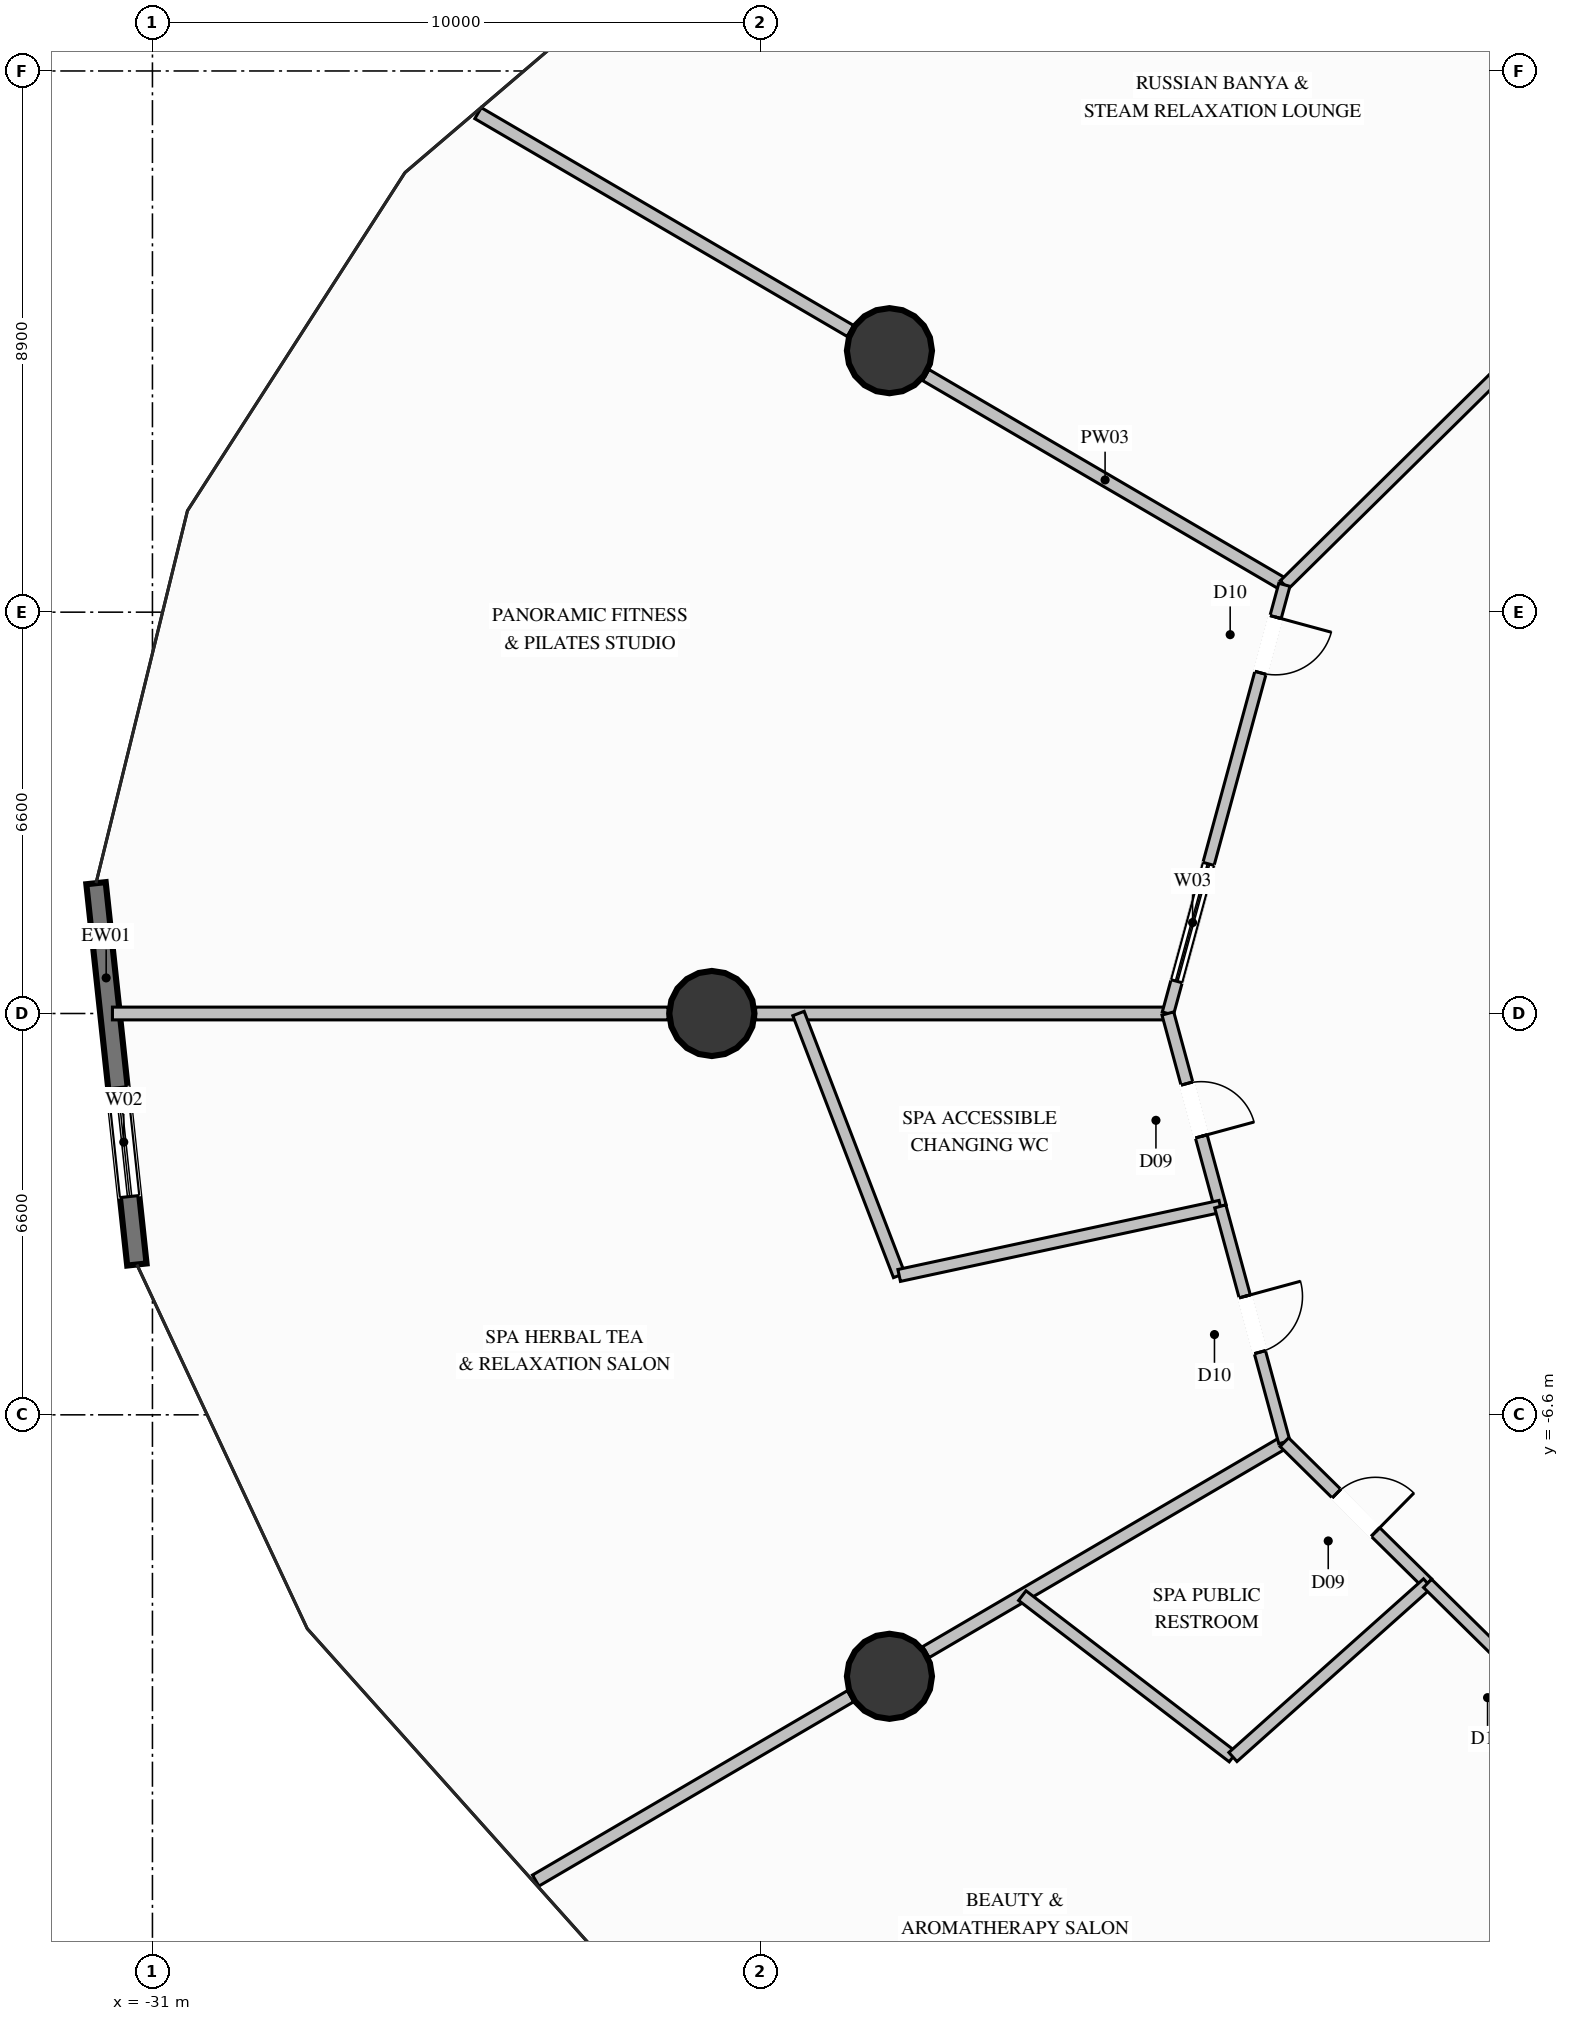
"""IFC4 building model, lengths in metres.
Left out: names, types, materials, properties, quantities, classifications, styles, units other than length and angle.
Written with IfcOpenShell. Run it as: python <this file> out.ifc"""

import sys

from ifc_helpers import new_model, si_unit, direction, frame, frame_2d, origin, origin_2d, place, context, subcontext, project, spatial, rectangle, circle, extrude, element, fill, save


model = new_model("IFC4")
c1 = context("Model", 3, precision=1e-05, world=origin(), true_north=direction((0.0, 1.0)))
c2 = subcontext(c1, "Body", "Model", "MODEL_VIEW")
j1 = project(units=[si_unit("LENGTHUNIT", "METRE"), si_unit("PLANEANGLEUNIT", "RADIAN")], contexts=[c1])
p1 = place(None, origin())
s1 = spatial("IfcSite", under=j1, at=p1, CompositionType="ELEMENT")
p2 = place(p1, origin())
s2 = spatial("IfcBuilding", under=s1, at=p2, CompositionType="ELEMENT")
p3 = place(p2, frame((0.0, 0.0, 23.6)))
s3 = spatial("IfcBuildingStorey", under=s2, at=p3, CompositionType="ELEMENT", Elevation=23.6)
for number, where, z_axis, x_axis in (
    (1, (-18.879, 10.9, 0.0), (0.0, 0.0, 1.0), (1.0, 0.0, 0.0)),
    (2, (-21.8, 0.0, 0.0), (0.0, 0.0, 1.0), (1.0, 0.0, 0.0)),
    (3, (-18.879, -10.9, 0.0), (0.0, 0.0, 1.0), (1.0, 0.0, 0.0)),
):
    element("IfcColumn", number, at=place(p3, frame(where, z_axis=z_axis, x_axis=x_axis)), inside=s3, PredefinedType="COLUMN", context=c2, shape_type="SweptSolid", body=[
        extrude(circle(Radius=0.7, at=origin_2d()), origin(), (0.0, 0.0, 1.0), 4.8),
    ])
p4 = place(p3, frame((-31.256, -4.128, 0.0), z_axis=(0.0, 0.0, 1.0), x_axis=(-0.106530390003, 0.994309446805, 0.0)))
e4 = element("IfcWall", 4, at=p4, inside=s3, PredefinedType="SOLIDWALL", context=c2, shape_type="SweptSolid", body=[
    extrude(rectangle(XDim=6.307, YDim=0.32, at=frame_2d((3.153, 0.0))), origin(), (0.0, 0.0, 1.0), 4.54),
])
p5 = place(p4, frame((1.124, 0.0, 0.65)))
e5 = element("IfcOpeningElement", 5, at=p5, cuts=e4, PredefinedType="OPENING", context=c2, shape_type="SweptSolid", body=[
    extrude(rectangle(XDim=1.8, YDim=2.6, at=frame_2d((0.9, 1.3))), frame((0.0, 0.17, 0.0), z_axis=(0.0, -1.0, 0.0), x_axis=(1.0, 0.0, 0.0)), (0.0, 0.0, 1.0), 0.34),
])
p6 = place(p3, frame((-12.384, 7.05, 0.0), z_axis=(0.0, 0.0, 1.0), x_axis=(-0.863200238908, 0.504861711313, 0.0)))
e6 = element("IfcWall", 6, at=p6, inside=s3, PredefinedType="PARTITIONING", context=c2, shape_type="SweptSolid", body=[
    extrude(rectangle(XDim=6.832, YDim=0.21, at=frame_2d((3.416, 0.0))), origin(), (0.0, 0.0, 1.0), 2.725),
])
p7 = place(p3, frame((-19.522, 11.225, 0.0), z_axis=(0.0, 0.0, 1.0), x_axis=(-0.863224110389, 0.504820894222, 0.0)))
e7 = element("IfcWall", 7, at=p7, inside=s3, PredefinedType="PARTITIONING", context=c2, shape_type="SweptSolid", body=[
    extrude(rectangle(XDim=7.093, YDim=0.21, at=frame_2d((3.547, 0.0))), origin(), (0.0, 0.0, 1.0), 4.54),
])
p8 = place(p3, frame((-14.3, 0.0, 0.0), z_axis=(0.0, 0.0, 1.0), x_axis=(-1.0, 0.0, 0.0)))
e8 = element("IfcWall", 8, at=p8, inside=s3, PredefinedType="PARTITIONING", context=c2, shape_type="SweptSolid", body=[
    extrude(rectangle(XDim=6.78, YDim=0.21, at=frame_2d((3.39, 0.0))), origin(), (0.0, 0.0, 1.0), 2.725),
])
p9 = place(p3, frame((-22.52, 0.0, 0.0), z_axis=(0.0, 0.0, 1.0), x_axis=(-1.0, 0.0, 0.0)))
e9 = element("IfcWall", 9, at=p9, inside=s3, PredefinedType="PARTITIONING", context=c2, shape_type="SweptSolid", body=[
    extrude(rectangle(XDim=9.138, YDim=0.21, at=frame_2d((4.569, 0.0))), origin(), (0.0, 0.0, 1.0), 4.54),
])
p10 = place(p3, frame((-12.384, -7.05, 0.0), z_axis=(0.0, 0.0, 1.0), x_axis=(-0.862940354658, -0.505305792865, 0.0)))
e10 = element("IfcWall", 10, at=p10, inside=s3, PredefinedType="PARTITIONING", context=c2, shape_type="SweptSolid", body=[
    extrude(rectangle(XDim=6.831, YDim=0.21, at=frame_2d((3.416, 0.0))), origin(), (0.0, 0.0, 1.0), 2.725),
])
p11 = place(p3, frame((-19.52, -11.228, 0.0), z_axis=(0.0, 0.0, 1.0), x_axis=(-0.862973355077, -0.505249431892, 0.0)))
e11 = element("IfcWall", 11, at=p11, inside=s3, PredefinedType="PARTITIONING", context=c2, shape_type="SweptSolid", body=[
    extrude(rectangle(XDim=5.999, YDim=0.21, at=frame_2d((3.0, 0.0))), origin(), (0.0, 0.0, 1.0), 4.54),
])
p12 = place(p3, frame((-7.15, -12.211, 0.0), z_axis=(0.0, 0.0, 1.0), x_axis=(-0.493009905658, -0.87002369676, 0.0)))
e12 = element("IfcWall", 12, at=p12, inside=s3, PredefinedType="PARTITIONING", context=c2, shape_type="SweptSolid", body=[
    extrude(rectangle(XDim=6.931, YDim=0.21, at=frame_2d((3.465, 0.0))), origin(), (0.0, 0.0, 1.0), 2.725),
])
p13 = place(p3, frame((-7.15, 12.211, 0.0), z_axis=(0.0, 0.0, 1.0), x_axis=(-0.712071304345, -0.702107155303, 0.0)))
e13 = element("IfcWall", 13, at=p13, inside=s3, PredefinedType="PARTITIONING", context=c2, shape_type="SweptSolid", body=[
    extrude(rectangle(XDim=7.351, YDim=0.19, at=frame_2d((3.675, 0.0))), origin(), (0.0, 0.0, 1.0), 4.54),
])
p14 = place(p3, frame((-12.384, 7.05, 0.0), z_axis=(0.0, 0.0, 1.0), x_axis=(-0.262260528785, -0.964997106235, 0.0)))
e14 = element("IfcWall", 14, at=p14, inside=s3, PredefinedType="PARTITIONING", context=c2, shape_type="SweptSolid", body=[
    extrude(rectangle(XDim=7.306, YDim=0.19, at=frame_2d((3.653, 0.0))), origin(), (0.0, 0.0, 1.0), 4.54),
])
p15 = place(p14, frame((0.55, 0.0, 0.0)))
e15 = element("IfcOpeningElement", 15, at=p15, cuts=e14, PredefinedType="OPENING", context=c2, shape_type="SweptSolid", body=[
    extrude(rectangle(XDim=0.95, YDim=2.1, at=frame_2d((0.475, 1.05))), frame((0.0, 0.105, 0.0), z_axis=(0.0, -1.0, 0.0), x_axis=(1.0, 0.0, 0.0)), (0.0, 0.0, 1.0), 0.21),
])
p16 = place(p14, frame((4.756, 0.0, 0.9)))
e16 = element("IfcOpeningElement", 16, at=p16, cuts=e14, PredefinedType="OPENING", context=c2, shape_type="SweptSolid", body=[
    extrude(rectangle(XDim=2.0, YDim=1.6, at=frame_2d((1.0, 0.8))), frame((0.0, 0.105, 0.0), z_axis=(0.0, -1.0, 0.0), x_axis=(1.0, 0.0, 0.0)), (0.0, 0.0, 1.0), 0.21),
])
p17 = place(p3, frame((-14.3, 0.0, 0.0), z_axis=(0.0, 0.0, 1.0), x_axis=(0.262250045558, -0.964999955236, 0.0)))
e17 = element("IfcWall", 17, at=p17, inside=s3, PredefinedType="PLUMBINGWALL", context=c2, shape_type="SweptSolid", body=[
    extrude(rectangle(XDim=3.287, YDim=0.2, at=frame_2d((1.644, 0.0))), origin(), (0.0, 0.0, 1.0), 4.54),
])
p18 = place(p17, frame((1.194, 0.0, 0.0)))
e18 = element("IfcOpeningElement", 18, at=p18, cuts=e17, PredefinedType="OPENING", context=c2, shape_type="SweptSolid", body=[
    extrude(rectangle(XDim=0.9, YDim=2.1, at=frame_2d((0.45, 1.05))), frame((0.0, 0.11, 0.0), z_axis=(0.0, -1.0, 0.0), x_axis=(1.0, 0.0, 0.0)), (0.0, 0.0, 1.0), 0.22),
])
p19 = place(p3, frame((-20.375, 0.0, 0.0), z_axis=(0.0, 0.0, 1.0), x_axis=(0.35879829675, -0.93341511786, 0.0)))
e19 = element("IfcWall", 19, at=p19, inside=s3, PredefinedType="PLUMBINGWALL", context=c2, shape_type="SweptSolid", body=[
    extrude(rectangle(XDim=4.615, YDim=0.2, at=frame_2d((2.308, 0.0))), origin(), (0.0, 0.0, 1.0), 4.54),
])
p20 = place(p3, frame((-13.438, -3.172, 0.0), z_axis=(0.0, 0.0, 1.0), x_axis=(-0.977637421757, -0.210297578634, 0.0)))
e20 = element("IfcWall", 20, at=p20, inside=s3, PredefinedType="PLUMBINGWALL", context=c2, shape_type="SweptSolid", body=[
    extrude(rectangle(XDim=5.402, YDim=0.2, at=frame_2d((2.701, 0.0))), origin(), (0.0, 0.0, 1.0), 4.54),
])
p21 = place(p3, frame((-13.438, -3.172, 0.0), z_axis=(0.0, 0.0, 1.0), x_axis=(0.262269103922, -0.9649947757, 0.0)))
e21 = element("IfcWall", 21, at=p21, inside=s3, PredefinedType="PARTITIONING", context=c2, shape_type="SweptSolid", body=[
    extrude(rectangle(XDim=4.019, YDim=0.19, at=frame_2d((2.009, 0.0))), origin(), (0.0, 0.0, 1.0), 4.54),
])
p22 = place(p21, frame((1.534, 0.0, 0.0)))
e22 = element("IfcOpeningElement", 22, at=p22, cuts=e21, PredefinedType="OPENING", context=c2, shape_type="SweptSolid", body=[
    extrude(rectangle(XDim=0.95, YDim=2.1, at=frame_2d((0.475, 1.05))), frame((0.0, 0.105, 0.0), z_axis=(0.0, -1.0, 0.0), x_axis=(1.0, 0.0, 0.0)), (0.0, 0.0, 1.0), 0.21),
])
p23 = place(p3, frame((-12.384, -7.05, 0.0), z_axis=(0.0, 0.0, 1.0), x_axis=(0.712072104827, -0.70210634346, 0.0)))
e23 = element("IfcWall", 23, at=p23, inside=s3, PredefinedType="PLUMBINGWALL", context=c2, shape_type="SweptSolid", body=[
    extrude(rectangle(XDim=3.307, YDim=0.2, at=frame_2d((1.654, 0.0))), origin(), (0.0, 0.0, 1.0), 4.54),
])
p24 = place(p23, frame((1.204, 0.0, 0.0)))
e24 = element("IfcOpeningElement", 24, at=p24, cuts=e23, PredefinedType="OPENING", context=c2, shape_type="SweptSolid", body=[
    extrude(rectangle(XDim=0.9, YDim=2.1, at=frame_2d((0.45, 1.05))), frame((0.0, 0.11, 0.0), z_axis=(0.0, -1.0, 0.0), x_axis=(1.0, 0.0, 0.0)), (0.0, 0.0, 1.0), 0.22),
])
p25 = place(p3, frame((-16.694, -9.573, 0.0), z_axis=(0.0, 0.0, 1.0), x_axis=(0.79380171633, -0.608176647983, 0.0)))
e25 = element("IfcWall", 25, at=p25, inside=s3, PredefinedType="PLUMBINGWALL", context=c2, shape_type="SweptSolid", body=[
    extrude(rectangle(XDim=4.364, YDim=0.2, at=frame_2d((2.182, 0.0))), origin(), (0.0, 0.0, 1.0), 4.54),
])
p26 = place(p3, frame((-10.029, -9.372, 0.0), z_axis=(0.0, 0.0, 1.0), x_axis=(-0.746283971534, -0.665627699117, 0.0)))
e26 = element("IfcWall", 26, at=p26, inside=s3, PredefinedType="PLUMBINGWALL", context=c2, shape_type="SweptSolid", body=[
    extrude(rectangle(XDim=4.289, YDim=0.2, at=frame_2d((2.145, 0.0))), origin(), (0.0, 0.0, 1.0), 4.54),
])
p27 = place(p3, frame((-10.029, -9.372, 0.0), z_axis=(0.0, 0.0, 1.0), x_axis=(0.712070649597, -0.702107819343, 0.0)))
e27 = element("IfcWall", 27, at=p27, inside=s3, PredefinedType="PARTITIONING", context=c2, shape_type="SweptSolid", body=[
    extrude(rectangle(XDim=4.043, YDim=0.19, at=frame_2d((2.022, 0.0))), origin(), (0.0, 0.0, 1.0), 4.54),
])
p28 = place(p27, frame((1.547, 0.0, 0.0)))
e28 = element("IfcOpeningElement", 28, at=p28, cuts=e27, PredefinedType="OPENING", context=c2, shape_type="SweptSolid", body=[
    extrude(rectangle(XDim=0.95, YDim=2.1, at=frame_2d((0.475, 1.05))), frame((0.0, 0.105, 0.0), z_axis=(0.0, -1.0, 0.0), x_axis=(1.0, 0.0, 0.0)), (0.0, 0.0, 1.0), 0.21),
])
p29 = place(p5, origin())
e29 = element("IfcWindow", 29, at=p29, inside=s3, PartitioningType="SINGLE_PANEL", PredefinedType="WINDOW", context=c2, shape_type="SweptSolid", body=[
    extrude(rectangle(XDim=1.8, YDim=2.6, at=frame_2d((0.9, 1.3))), frame((0.0, 0.03, 0.0), z_axis=(0.0, -1.0, 0.0), x_axis=(1.0, 0.0, 0.0)), (0.0, 0.0, 1.0), 0.06),
])
fill(e5, e29)
p30 = place(p15, origin())
e30 = element("IfcDoor", 30, at=p30, inside=s3, OperationType="SINGLE_SWING_LEFT", PredefinedType="DOOR", context=c2, shape_type="SweptSolid", body=[
    extrude(rectangle(XDim=0.95, YDim=2.1, at=frame_2d((0.475, 1.05))), frame((0.0, 0.025, 0.0), z_axis=(0.0, -1.0, 0.0), x_axis=(1.0, 0.0, 0.0)), (0.0, 0.0, 1.0), 0.05),
])
fill(e15, e30)
p31 = place(p16, origin())
e31 = element("IfcWindow", 31, at=p31, inside=s3, PartitioningType="SINGLE_PANEL", PredefinedType="WINDOW", context=c2, shape_type="SweptSolid", body=[
    extrude(rectangle(XDim=2.0, YDim=1.6, at=frame_2d((1.0, 0.8))), frame((0.0, 0.03, 0.0), z_axis=(0.0, -1.0, 0.0), x_axis=(1.0, 0.0, 0.0)), (0.0, 0.0, 1.0), 0.06),
])
fill(e16, e31)
p32 = place(p18, origin())
e32 = element("IfcDoor", 32, at=p32, inside=s3, OperationType="SINGLE_SWING_RIGHT", PredefinedType="DOOR", context=c2, shape_type="SweptSolid", body=[
    extrude(rectangle(XDim=0.9, YDim=2.1, at=frame_2d((0.45, 1.05))), frame((0.0, 0.025, 0.0), z_axis=(0.0, -1.0, 0.0), x_axis=(1.0, 0.0, 0.0)), (0.0, 0.0, 1.0), 0.05),
])
fill(e18, e32)
p33 = place(p22, origin())
e33 = element("IfcDoor", 33, at=p33, inside=s3, OperationType="SINGLE_SWING_LEFT", PredefinedType="DOOR", context=c2, shape_type="SweptSolid", body=[
    extrude(rectangle(XDim=0.95, YDim=2.1, at=frame_2d((0.475, 1.05))), frame((0.0, 0.025, 0.0), z_axis=(0.0, -1.0, 0.0), x_axis=(1.0, 0.0, 0.0)), (0.0, 0.0, 1.0), 0.05),
])
fill(e22, e33)
p34 = place(p24, origin())
e34 = element("IfcDoor", 34, at=p34, inside=s3, OperationType="SINGLE_SWING_RIGHT", PredefinedType="DOOR", context=c2, shape_type="SweptSolid", body=[
    extrude(rectangle(XDim=0.9, YDim=2.1, at=frame_2d((0.45, 1.05))), frame((0.0, 0.025, 0.0), z_axis=(0.0, -1.0, 0.0), x_axis=(1.0, 0.0, 0.0)), (0.0, 0.0, 1.0), 0.05),
])
fill(e24, e34)
save(model, sys.argv[1])
